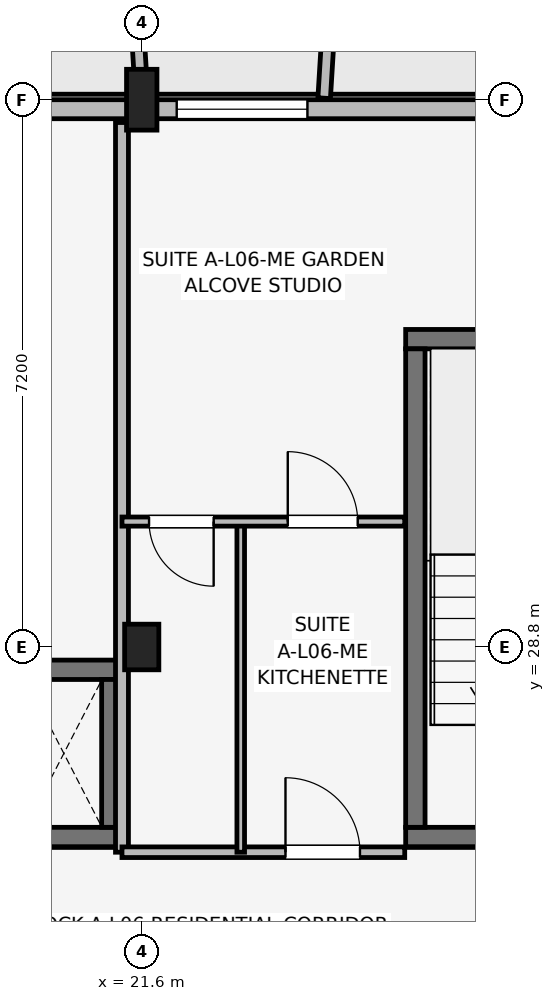
"""IFC4 building model, lengths in metres.
Left out: names, types, materials, properties, quantities, classifications, styles, units other than length and angle.
Written with IfcOpenShell. Run it as: python <this file> out.ifc"""

import sys

from ifc_helpers import new_model, si_unit, direction, frame, frame_2d, origin, origin_2d, place, context, subcontext, project, spatial, rectangle, extrude, element, fill, save


model = new_model("IFC4")
c1 = context("Model", 3, precision=1e-05, world=origin(), true_north=direction((0.0, 1.0)))
c2 = subcontext(c1, "Body", "Model", "MODEL_VIEW")
j1 = project(units=[si_unit("LENGTHUNIT", "METRE"), si_unit("PLANEANGLEUNIT", "RADIAN")], contexts=[c1])
p1 = place(None, origin())
s1 = spatial("IfcSite", under=j1, at=p1, CompositionType="ELEMENT")
p2 = place(p1, origin())
s2 = spatial("IfcBuilding", under=s1, at=p2, CompositionType="ELEMENT")
p3 = place(p2, frame((0.0, 0.0, 21.3)))
s3 = spatial("IfcBuildingStorey", under=s2, at=p3, CompositionType="ELEMENT", Elevation=21.3)
p4 = place(p3, frame((21.6, 28.8, 0.0), z_axis=(0.0, 0.0, 1.0), x_axis=(1.0, 0.0, 0.0)))
e1 = element("IfcColumn", 1, at=p4, inside=s3, PredefinedType="COLUMN", context=c2, shape_type="SweptSolid", body=[
    extrude(rectangle(XDim=0.45, YDim=0.6, at=origin_2d()), origin(), (0.0, 0.0, 1.0), 3.15),
])
p5 = place(p3, frame((21.6, 36.0, 0.0), z_axis=(0.0, 0.0, 1.0), x_axis=(1.0, 0.0, 0.0)))
e2 = element("IfcColumn", 2, at=p5, inside=s3, PredefinedType="COLUMN", context=c2, shape_type="SweptSolid", body=[
    extrude(rectangle(XDim=0.4, YDim=0.8, at=origin_2d()), origin(), (0.0, 0.0, 1.0), 3.15),
])
p6 = place(p3, frame((25.073, 26.3, 0.0), z_axis=(0.0, 0.0, 1.0), x_axis=(1.0, 0.0, 0.0)))
e3 = element("IfcWall", 3, at=p6, inside=s3, PredefinedType="SHEAR", context=c2, shape_type="SweptSolid", body=[
    extrude(rectangle(XDim=3.305, YDim=0.255, at=frame_2d((1.652, 0.0))), origin(), (0.0, 0.0, 1.0), 3.15),
])
p7 = place(p6, frame((1.127, 0.0, 0.0)))
e4 = element("IfcOpeningElement", 4, at=p7, cuts=e3, PredefinedType="OPENING", context=c2, shape_type="SweptSolid", body=[
    extrude(rectangle(XDim=1.05, YDim=2.12, at=frame_2d((0.525, 1.06))), frame((0.0, 0.137, 0.0), z_axis=(0.0, -1.0, 0.0), x_axis=(1.0, 0.0, 0.0)), (0.0, 0.0, 1.0), 0.275),
])
p8 = place(p3, frame((25.073, 32.85, 0.0), z_axis=(0.0, 0.0, 1.0), x_axis=(1.0, 0.0, 0.0)))
e5 = element("IfcWall", 5, at=p8, inside=s3, PredefinedType="SHEAR", context=c2, shape_type="SweptSolid", body=[
    extrude(rectangle(XDim=3.305, YDim=0.255, at=frame_2d((1.652, 0.0))), origin(), (0.0, 0.0, 1.0), 3.15),
])
p9 = place(p3, frame((25.2, 26.427, 0.0), z_axis=(0.0, 0.0, 1.0), x_axis=(0.0, 1.0, 0.0)))
e6 = element("IfcWall", 6, at=p9, inside=s3, PredefinedType="SHEAR", context=c2, shape_type="SweptSolid", body=[
    extrude(rectangle(XDim=6.295, YDim=0.255, at=frame_2d((3.147, 0.0))), origin(), (0.0, 0.0, 1.0), 3.15),
])
for number, where, z_axis, x_axis in (
    (7, (19.522, 26.3, 0.0), (0.0, 0.0, 1.0), (1.0, 0.0, 0.0)),
    (8, (19.522, 28.5, 0.0), (0.0, 0.0, 1.0), (1.0, 0.0, 0.0)),
):
    element("IfcWall", number, at=place(p3, frame(where, z_axis=z_axis, x_axis=x_axis)), inside=s3, PredefinedType="SHEAR", context=c2, shape_type="SweptSolid", body=[
        extrude(rectangle(XDim=1.805, YDim=0.255, at=frame_2d((0.902, 0.0))), origin(), (0.0, 0.0, 1.0), 3.15),
    ])
p10 = place(p3, frame((21.2, 26.427, 0.0), z_axis=(0.0, 0.0, 1.0), x_axis=(0.0, 1.0, 0.0)))
e9 = element("IfcWall", 9, at=p10, inside=s3, PredefinedType="SHEAR", context=c2, shape_type="SweptSolid", body=[
    extrude(rectangle(XDim=1.945, YDim=0.255, at=frame_2d((0.973, 0.0))), origin(), (0.0, 0.0, 1.0), 3.15),
])
p11 = place(p3, frame((32.6, 35.875, 0.0), z_axis=(0.0, 0.0, 1.0), x_axis=(-1.0, 0.0, 0.0)))
e10 = element("IfcWall", 10, at=p11, inside=s3, PredefinedType="SOLIDWALL", context=c2, shape_type="SweptSolid", body=[
    extrude(rectangle(XDim=29.2, YDim=0.25, at=frame_2d((14.6, 0.0))), origin(), (0.0, 0.0, 1.0), 2.43),
])
p12 = place(p11, frame((27.55, 0.0, 0.0), z_axis=(0.0, 0.0, 1.0), x_axis=(-1.0, 0.0, 0.0)))
e11 = element("IfcOpeningElement", 11, at=p12, cuts=e10, PredefinedType="OPENING", context=c2, shape_type="SweptSolid", body=[
    extrude(rectangle(XDim=1.5, YDim=2.15, at=frame_2d((0.75, 1.075))), frame((0.0, 0.135, 0.0), z_axis=(0.0, -1.0, 0.0), x_axis=(1.0, 0.0, 0.0)), (0.0, 0.0, 1.0), 0.27),
])
p13 = place(p11, frame((3.15, 0.0, 0.0), z_axis=(0.0, 0.0, 1.0), x_axis=(-1.0, 0.0, 0.0)))
e12 = element("IfcOpeningElement", 12, at=p13, cuts=e10, PredefinedType="OPENING", context=c2, shape_type="SweptSolid", body=[
    extrude(rectangle(XDim=1.5, YDim=2.15, at=frame_2d((0.75, 1.075))), frame((0.0, 0.135, 0.0), z_axis=(0.0, -1.0, 0.0), x_axis=(1.0, 0.0, 0.0)), (0.0, 0.0, 1.0), 0.27),
])
p14 = place(p11, frame((14.225, 0.0, 0.5)))
e13 = element("IfcOpeningElement", 13, at=p14, cuts=e10, PredefinedType="OPENING", context=c2, shape_type="SweptSolid", body=[
    extrude(rectangle(XDim=0.75, YDim=1.75, at=frame_2d((0.375, 0.875))), frame((0.0, 0.135, 0.0), z_axis=(0.0, -1.0, 0.0), x_axis=(1.0, 0.0, 0.0)), (0.0, 0.0, 1.0), 0.27),
])
p15 = place(p11, frame((8.82, 0.0, 0.7)))
e14 = element("IfcOpeningElement", 14, at=p15, cuts=e10, PredefinedType="OPENING", context=c2, shape_type="SweptSolid", body=[
    extrude(rectangle(XDim=1.72, YDim=1.6, at=frame_2d((0.86, 0.8))), frame((0.0, 0.135, 0.0), z_axis=(0.0, -1.0, 0.0), x_axis=(1.0, 0.0, 0.0)), (0.0, 0.0, 1.0), 0.27),
])
p16 = place(p11, frame((18.59, 0.0, 0.7)))
e15 = element("IfcOpeningElement", 15, at=p16, cuts=e10, PredefinedType="OPENING", context=c2, shape_type="SweptSolid", body=[
    extrude(rectangle(XDim=1.86, YDim=1.6, at=frame_2d((0.93, 0.8))), frame((0.0, 0.135, 0.0), z_axis=(0.0, -1.0, 0.0), x_axis=(1.0, 0.0, 0.0)), (0.0, 0.0, 1.0), 0.27),
])
p17 = place(p3, frame((21.6, 36.02, 0.0), z_axis=(0.0, 0.0, 1.0), x_axis=(-0.061170732449, 0.998127317276, 0.0)))
e16 = element("IfcWall", 16, at=p17, inside=s3, PredefinedType="ELEMENTEDWALL", context=c2, shape_type="SweptSolid", body=[
    extrude(rectangle(XDim=1.964, YDim=0.165, at=frame_2d((0.982, 0.0))), origin(), (0.0, 0.0, 1.0), 2.53),
])
p18 = place(p3, frame((24.0, 36.02, 0.0), z_axis=(0.0, 0.0, 1.0), x_axis=(0.061170732449, 0.998127317276, 0.0)))
e17 = element("IfcWall", 17, at=p18, inside=s3, PredefinedType="ELEMENTEDWALL", context=c2, shape_type="SweptSolid", body=[
    extrude(rectangle(XDim=1.964, YDim=0.165, at=frame_2d((0.982, 0.0))), origin(), (0.0, 0.0, 1.0), 2.55),
])
p19 = place(p3, frame((21.34, 26.1, 0.0), z_axis=(0.0, 0.0, 1.0), x_axis=(0.0, 1.0, 0.0)))
e18 = element("IfcWall", 18, at=p19, inside=s3, PredefinedType="PARTITIONING", context=c2, shape_type="SweptSolid", body=[
    extrude(rectangle(XDim=9.6, YDim=0.17, at=frame_2d((4.8, 0.0))), origin(), (0.0, 0.0, 1.0), 2.38),
])
p20 = place(p3, frame((21.34, 26.1, 0.0), z_axis=(0.0, 0.0, 1.0), x_axis=(1.0, 0.0, 0.0)))
e19 = element("IfcWall", 19, at=p20, inside=s3, PredefinedType="PARTITIONING", context=c2, shape_type="SweptSolid", body=[
    extrude(rectangle(XDim=3.72, YDim=0.14, at=frame_2d((1.86, 0.0))), origin(), (0.0, 0.0, 1.0), 2.38),
])
p21 = place(p20, frame((2.151, 0.0, 0.0)))
e20 = element("IfcOpeningElement", 20, at=p21, cuts=e19, PredefinedType="OPENING", context=c2, shape_type="SweptSolid", body=[
    extrude(rectangle(XDim=0.98, YDim=2.1, at=frame_2d((0.49, 1.05))), frame((0.0, 0.08, 0.0), z_axis=(0.0, -1.0, 0.0), x_axis=(1.0, 0.0, 0.0)), (0.0, 0.0, 1.0), 0.16),
])
p22 = place(p3, frame((22.902, 26.1, 0.0), z_axis=(0.0, 0.0, 1.0), x_axis=(0.0, 1.0, 0.0)))
e21 = element("IfcWall", 21, at=p22, inside=s3, PredefinedType="PARTITIONING", context=c2, shape_type="SweptSolid", body=[
    extrude(rectangle(XDim=4.35, YDim=0.1, at=frame_2d((2.175, 0.0))), origin(), (0.0, 0.0, 1.0), 2.38),
])
p23 = place(p3, frame((21.34, 30.45, 0.0), z_axis=(0.0, 0.0, 1.0), x_axis=(1.0, 0.0, 0.0)))
e22 = element("IfcWall", 22, at=p23, inside=s3, PredefinedType="PARTITIONING", context=c2, shape_type="SweptSolid", body=[
    extrude(rectangle(XDim=3.72, YDim=0.12, at=frame_2d((1.86, 0.0))), origin(), (0.0, 0.0, 1.0), 2.38),
])
p24 = place(p23, frame((1.206, 0.0, 0.0), z_axis=(0.0, 0.0, 1.0), x_axis=(-1.0, 0.0, 0.0)))
e23 = element("IfcOpeningElement", 23, at=p24, cuts=e22, PredefinedType="OPENING", context=c2, shape_type="SweptSolid", body=[
    extrude(rectangle(XDim=0.85, YDim=2.08, at=frame_2d((0.425, 1.04))), frame((0.0, 0.07, 0.0), z_axis=(0.0, -1.0, 0.0), x_axis=(1.0, 0.0, 0.0)), (0.0, 0.0, 1.0), 0.14),
])
p25 = place(p23, frame((2.181, 0.0, 0.0)))
e24 = element("IfcOpeningElement", 24, at=p25, cuts=e22, PredefinedType="OPENING", context=c2, shape_type="SweptSolid", body=[
    extrude(rectangle(XDim=0.92, YDim=2.08, at=frame_2d((0.46, 1.04))), frame((0.0, 0.07, 0.0), z_axis=(0.0, -1.0, 0.0), x_axis=(1.0, 0.0, 0.0)), (0.0, 0.0, 1.0), 0.14),
])
p26 = place(p15, origin())
e25 = element("IfcWindow", 25, at=p26, inside=s3, PartitioningType="SINGLE_PANEL", PredefinedType="WINDOW", context=c2, shape_type="SweptSolid", body=[
    extrude(rectangle(XDim=1.72, YDim=1.6, at=frame_2d((0.86, 0.8))), frame((0.0, 0.03, 0.0), z_axis=(0.0, -1.0, 0.0), x_axis=(1.0, 0.0, 0.0)), (0.0, 0.0, 1.0), 0.06),
])
fill(e14, e25)
p27 = place(p21, origin())
e26 = element("IfcDoor", 26, at=p27, inside=s3, OperationType="SINGLE_SWING_LEFT", PredefinedType="DOOR", context=c2, shape_type="SweptSolid", body=[
    extrude(rectangle(XDim=0.98, YDim=2.1, at=frame_2d((0.49, 1.05))), frame((0.0, 0.025, 0.0), z_axis=(0.0, -1.0, 0.0), x_axis=(1.0, 0.0, 0.0)), (0.0, 0.0, 1.0), 0.05),
])
fill(e20, e26)
p28 = place(p24, origin())
e27 = element("IfcDoor", 27, at=p28, inside=s3, OperationType="SINGLE_SWING_RIGHT", PredefinedType="DOOR", context=c2, shape_type="SweptSolid", body=[
    extrude(rectangle(XDim=0.85, YDim=2.08, at=frame_2d((0.425, 1.04))), frame((0.0, 0.025, 0.0), z_axis=(0.0, -1.0, 0.0), x_axis=(1.0, 0.0, 0.0)), (0.0, 0.0, 1.0), 0.05),
])
fill(e23, e27)
p29 = place(p25, origin())
e28 = element("IfcDoor", 28, at=p29, inside=s3, OperationType="SINGLE_SWING_LEFT", PredefinedType="DOOR", context=c2, shape_type="SweptSolid", body=[
    extrude(rectangle(XDim=0.92, YDim=2.08, at=frame_2d((0.46, 1.04))), frame((0.0, 0.025, 0.0), z_axis=(0.0, -1.0, 0.0), x_axis=(1.0, 0.0, 0.0)), (0.0, 0.0, 1.0), 0.05),
])
fill(e24, e28)
save(model, sys.argv[1])
